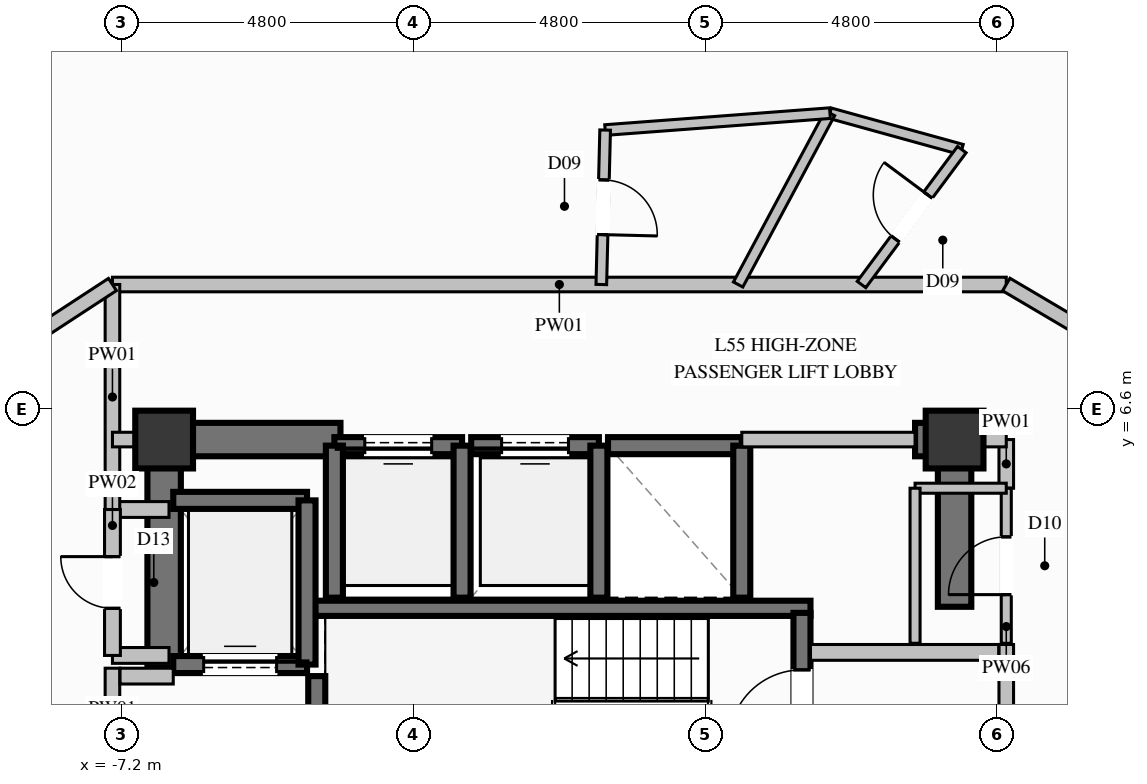
"""IFC4 building model, lengths in metres.
Left out: names, types, materials, properties, quantities, classifications, styles, units other than length and angle.
Written with IfcOpenShell. Run it as: python <this file> out.ifc"""

import sys

from ifc_helpers import new_model, si_unit, direction, frame, frame_2d, origin, origin_2d, place, context, subcontext, project, spatial, rectangle, extrude, element, fill, save


model = new_model("IFC4")
c1 = context("Model", 3, precision=1e-05, world=origin(), true_north=direction((0.0, 1.0)))
c2 = subcontext(c1, "Body", "Model", "MODEL_VIEW")
j1 = project(units=[si_unit("LENGTHUNIT", "METRE"), si_unit("PLANEANGLEUNIT", "RADIAN")], contexts=[c1])
p1 = place(None, origin())
s1 = spatial("IfcSite", under=j1, at=p1, CompositionType="ELEMENT")
p2 = place(p1, origin())
s2 = spatial("IfcBuilding", under=s1, at=p2, CompositionType="ELEMENT")
p3 = place(p2, frame((0.0, 0.0, 212.8)))
s3 = spatial("IfcBuildingStorey", under=s2, at=p3, CompositionType="ELEMENT", Elevation=212.8)
for number, where, z_axis, x_axis in (
    (1, (6.5, 6.1, 0.0), (0.0, 0.0, 1.0), (1.0, 0.0, 0.0)),
    (2, (-6.5, 6.1, 0.0), (0.0, 0.0, 1.0), (1.0, 0.0, 0.0)),
):
    element("IfcColumn", number, at=place(p3, frame(where, z_axis=z_axis, x_axis=x_axis)), inside=s3, PredefinedType="COLUMN", context=c2, shape_type="SweptSolid", body=[
        extrude(rectangle(XDim=0.95, YDim=0.95, at=origin_2d()), origin(), (0.0, 0.0, 1.0), 3.6),
    ])
p4 = place(p3, frame((-4.13, 3.325, 0.0), z_axis=(0.0, 0.0, 1.0), x_axis=(1.0, 0.0, 0.0)))
e3 = element("IfcWall", 3, at=p4, inside=s3, PredefinedType="SOLIDWALL", context=c2, shape_type="SweptSolid", body=[
    extrude(rectangle(XDim=8.26, YDim=0.25, at=frame_2d((4.13, 0.0))), origin(), (0.0, 0.0, 1.0), 3.6),
])
p5 = place(p3, frame((-6.225, 6.1, 0.0), z_axis=(0.0, 0.0, 1.0), x_axis=(1.0, 0.0, 0.0)))
e4 = element("IfcWall", 4, at=p5, inside=s3, PredefinedType="SHEAR", context=c2, shape_type="SweptSolid", body=[
    extrude(rectangle(XDim=2.625, YDim=0.55, at=frame_2d((1.312, 0.0))), origin(), (0.0, 0.0, 1.0), 3.6),
])
p6 = place(p3, frame((5.85, 6.1, 0.0), z_axis=(0.0, 0.0, 1.0), x_axis=(1.0, 0.0, 0.0)))
e5 = element("IfcWall", 5, at=p6, inside=s3, PredefinedType="SHEAR", context=c2, shape_type="SweptSolid", body=[
    extrude(rectangle(XDim=0.375, YDim=0.55, at=frame_2d((0.188, 0.0))), origin(), (0.0, 0.0, 1.0), 3.6),
])
p7 = place(p3, frame((-6.5, 2.35, 0.0), z_axis=(0.0, 0.0, 1.0), x_axis=(0.0, 1.0, 0.0)))
e6 = element("IfcWall", 6, at=p7, inside=s3, PredefinedType="SHEAR", context=c2, shape_type="SweptSolid", body=[
    extrude(rectangle(XDim=4.025, YDim=0.55, at=frame_2d((2.012, 0.0))), origin(), (0.0, 0.0, 1.0), 3.6),
])
p8 = place(p3, frame((6.5, 3.35, 0.0), z_axis=(0.0, 0.0, 1.0), x_axis=(0.0, 1.0, 0.0)))
e7 = element("IfcWall", 7, at=p8, inside=s3, PredefinedType="SHEAR", context=c2, shape_type="SweptSolid", body=[
    extrude(rectangle(XDim=3.025, YDim=0.55, at=frame_2d((1.512, 0.0))), origin(), (0.0, 0.0, 1.0), 3.6),
])
p9 = place(p3, frame((-1.6, 6.0, 0.0), z_axis=(0.0, 0.0, 1.0), x_axis=(-1.0, 0.0, 0.0)))
e8 = element("IfcWall", 8, at=p9, inside=s3, PredefinedType="SOLIDWALL", context=c2, shape_type="SweptSolid", body=[
    extrude(rectangle(XDim=2.1, YDim=0.28, at=frame_2d((1.05, 0.0))), origin(), (0.0, 0.0, 1.0), 3.36),
])
p10 = place(p9, frame((0.5, 0.0, 0.0)))
e9 = element("IfcOpeningElement", 9, at=p10, cuts=e8, PredefinedType="OPENING", context=c2, shape_type="SweptSolid", body=[
    extrude(rectangle(XDim=1.1, YDim=2.2, at=frame_2d((0.55, 1.1))), frame((0.0, 0.15, 0.0), z_axis=(0.0, -1.0, 0.0), x_axis=(1.0, 0.0, 0.0)), (0.0, 0.0, 1.0), 0.3),
])
for number, where, z_axis, x_axis in (
    (10, (-3.7, 6.0, 0.0), (0.0, 0.0, 1.0), (0.0, -1.0, 0.0)),
    (11, (-1.6, 3.5, 0.0), (0.0, 0.0, 1.0), (0.0, 1.0, 0.0)),
):
    element("IfcWall", number, at=place(p3, frame(where, z_axis=z_axis, x_axis=x_axis)), inside=s3, PredefinedType="SOLIDWALL", context=c2, shape_type="SweptSolid", body=[
        extrude(rectangle(XDim=2.5, YDim=0.28, at=frame_2d((1.25, 0.0))), origin(), (0.0, 0.0, 1.0), 3.36),
    ])
p11 = place(p3, frame((0.65, 6.0, 0.0), z_axis=(0.0, 0.0, 1.0), x_axis=(-1.0, 0.0, 0.0)))
e12 = element("IfcWall", 12, at=p11, inside=s3, PredefinedType="SOLIDWALL", context=c2, shape_type="SweptSolid", body=[
    extrude(rectangle(XDim=2.1, YDim=0.28, at=frame_2d((1.05, 0.0))), origin(), (0.0, 0.0, 1.0), 3.36),
])
p12 = place(p11, frame((0.5, 0.0, 0.0)))
e13 = element("IfcOpeningElement", 13, at=p12, cuts=e12, PredefinedType="OPENING", context=c2, shape_type="SweptSolid", body=[
    extrude(rectangle(XDim=1.1, YDim=2.2, at=frame_2d((0.55, 1.1))), frame((0.0, 0.15, 0.0), z_axis=(0.0, -1.0, 0.0), x_axis=(1.0, 0.0, 0.0)), (0.0, 0.0, 1.0), 0.3),
])
p13 = place(p3, frame((0.65, 3.5, 0.0), z_axis=(0.0, 0.0, 1.0), x_axis=(0.0, 1.0, 0.0)))
e14 = element("IfcWall", 14, at=p13, inside=s3, PredefinedType="SOLIDWALL", context=c2, shape_type="SweptSolid", body=[
    extrude(rectangle(XDim=2.5, YDim=0.28, at=frame_2d((1.25, 0.0))), origin(), (0.0, 0.0, 1.0), 3.36),
])
p14 = place(p3, frame((3.0, 6.0, 0.0), z_axis=(0.0, 0.0, 1.0), x_axis=(-1.0, 0.0, 0.0)))
e15 = element("IfcWall", 15, at=p14, inside=s3, PredefinedType="SOLIDWALL", context=c2, shape_type="SweptSolid", body=[
    extrude(rectangle(XDim=2.2, YDim=0.28, at=frame_2d((1.1, 0.0))), origin(), (0.0, 0.0, 1.0), 3.36),
])
p15 = place(p3, frame((3.0, 3.5, 0.0), z_axis=(0.0, 0.0, 1.0), x_axis=(0.0, 1.0, 0.0)))
e16 = element("IfcWall", 16, at=p15, inside=s3, PredefinedType="SOLIDWALL", context=c2, shape_type="SweptSolid", body=[
    extrude(rectangle(XDim=2.5, YDim=0.28, at=frame_2d((1.25, 0.0))), origin(), (0.0, 0.0, 1.0), 3.36),
])
p16 = place(p3, frame((-6.35, 2.4, 0.0), z_axis=(0.0, 0.0, 1.0), x_axis=(1.0, 0.0, 0.0)))
e17 = element("IfcWall", 17, at=p16, inside=s3, PredefinedType="SOLIDWALL", context=c2, shape_type="SweptSolid", body=[
    extrude(rectangle(XDim=2.2, YDim=0.28, at=frame_2d((1.1, 0.0))), origin(), (0.0, 0.0, 1.0), 3.36),
])
p17 = place(p16, frame((0.5, 0.0, 0.0)))
e18 = element("IfcOpeningElement", 18, at=p17, cuts=e17, PredefinedType="OPENING", context=c2, shape_type="SweptSolid", body=[
    extrude(rectangle(XDim=1.2, YDim=2.2, at=frame_2d((0.6, 1.1))), frame((0.0, 0.15, 0.0), z_axis=(0.0, -1.0, 0.0), x_axis=(1.0, 0.0, 0.0)), (0.0, 0.0, 1.0), 0.3),
])
p18 = place(p3, frame((-4.15, 5.1, 0.0), z_axis=(0.0, 0.0, 1.0), x_axis=(-1.0, 0.0, 0.0)))
e19 = element("IfcWall", 19, at=p18, inside=s3, PredefinedType="SOLIDWALL", context=c2, shape_type="SweptSolid", body=[
    extrude(rectangle(XDim=2.2, YDim=0.28, at=frame_2d((1.1, 0.0))), origin(), (0.0, 0.0, 1.0), 3.36),
])
p19 = place(p3, frame((-4.15, 2.4, 0.0), z_axis=(0.0, 0.0, 1.0), x_axis=(0.0, 1.0, 0.0)))
e20 = element("IfcWall", 20, at=p19, inside=s3, PredefinedType="SOLIDWALL", context=c2, shape_type="SweptSolid", body=[
    extrude(rectangle(XDim=2.7, YDim=0.28, at=frame_2d((1.35, 0.0))), origin(), (0.0, 0.0, 1.0), 3.36),
])
p20 = place(p3, frame((-3.99, -3.25, 0.0), z_axis=(0.0, 0.0, 1.0), x_axis=(0.0, 1.0, 0.0)))
e21 = element("IfcWall", 21, at=p20, inside=s3, PredefinedType="SOLIDWALL", context=c2, shape_type="SweptSolid", body=[
    extrude(rectangle(XDim=5.46, YDim=0.28, at=frame_2d((2.73, 0.0))), origin(), (0.0, 0.0, 1.0), 3.36),
])
p21 = place(p20, frame((0.937, 0.0, 0.0)))
e22 = element("IfcOpeningElement", 22, at=p21, cuts=e21, PredefinedType="OPENING", context=c2, shape_type="SweptSolid", body=[
    extrude(rectangle(XDim=1.2, YDim=2.2, at=frame_2d((0.6, 1.1))), frame((0.0, 0.15, 0.0), z_axis=(0.0, -1.0, 0.0), x_axis=(1.0, 0.0, 0.0)), (0.0, 0.0, 1.0), 0.3),
])
p22 = place(p3, frame((3.99, -2.21, 0.0), z_axis=(0.0, 0.0, 1.0), x_axis=(0.0, 1.0, 0.0)))
e23 = element("IfcWall", 23, at=p22, inside=s3, PredefinedType="SOLIDWALL", context=c2, shape_type="SweptSolid", body=[
    extrude(rectangle(XDim=5.46, YDim=0.28, at=frame_2d((2.73, 0.0))), origin(), (0.0, 0.0, 1.0), 3.36),
])
p23 = place(p22, frame((3.323, 0.0, 0.0)))
e24 = element("IfcOpeningElement", 24, at=p23, cuts=e23, PredefinedType="OPENING", context=c2, shape_type="SweptSolid", body=[
    extrude(rectangle(XDim=1.2, YDim=2.2, at=frame_2d((0.6, 1.1))), frame((0.0, 0.15, 0.0), z_axis=(0.0, -1.0, 0.0), x_axis=(1.0, 0.0, 0.0)), (0.0, 0.0, 1.0), 0.3),
])
p24 = place(p3, frame((-7.35, -3.38, 0.0), z_axis=(0.0, 0.0, 1.0), x_axis=(0.0, 1.0, 0.0)))
e25 = element("IfcWall", 25, at=p24, inside=s3, PredefinedType="PARTITIONING", context=c2, shape_type="SweptSolid", body=[
    extrude(rectangle(XDim=5.72, YDim=0.24, at=frame_2d((2.86, 0.0))), origin(), (0.0, 0.0, 1.0), 2.445),
])
p25 = place(p24, frame((1.599, 0.0, 0.0)))
e26 = element("IfcOpeningElement", 26, at=p25, cuts=e25, PredefinedType="OPENING", context=c2, shape_type="SweptSolid", body=[
    extrude(rectangle(XDim=1.15, YDim=2.2, at=frame_2d((0.575, 1.1))), frame((0.0, 0.13, 0.0), z_axis=(0.0, -1.0, 0.0), x_axis=(1.0, 0.0, 0.0)), (0.0, 0.0, 1.0), 0.26),
])
p26 = place(p3, frame((-7.225, 2.21, 0.0), z_axis=(0.0, 0.0, 1.0), x_axis=(1.0, 0.0, 0.0)))
e27 = element("IfcWall", 27, at=p26, inside=s3, PredefinedType="PARTITIONING", context=c2, shape_type="SweptSolid", body=[
    extrude(rectangle(XDim=0.875, YDim=0.26, at=frame_2d((0.438, 0.0))), origin(), (0.0, 0.0, 1.0), 3.36),
])
p27 = place(p3, frame((7.35, -2.34, 0.0), z_axis=(0.0, 0.0, 1.0), x_axis=(0.0, 1.0, 0.0)))
e28 = element("IfcWall", 28, at=p27, inside=s3, PredefinedType="PARTITIONING", context=c2, shape_type="SweptSolid", body=[
    extrude(rectangle(XDim=5.07, YDim=0.24, at=frame_2d((2.535, 0.0))), origin(), (0.0, 0.0, 1.0), 2.445),
])
p28 = place(p27, frame((2.548, 0.0, 0.0)))
e29 = element("IfcOpeningElement", 29, at=p28, cuts=e28, PredefinedType="OPENING", context=c2, shape_type="SweptSolid", body=[
    extrude(rectangle(XDim=1.15, YDim=2.2, at=frame_2d((0.575, 1.1))), frame((0.0, 0.13, 0.0), z_axis=(0.0, -1.0, 0.0), x_axis=(1.0, 0.0, 0.0)), (0.0, 0.0, 1.0), 0.26),
])
p29 = place(p3, frame((4.13, 2.6, 0.0), z_axis=(0.0, 0.0, 1.0), x_axis=(1.0, 0.0, 0.0)))
e30 = element("IfcWall", 30, at=p29, inside=s3, PredefinedType="PARTITIONING", context=c2, shape_type="SweptSolid", body=[
    extrude(rectangle(XDim=3.095, YDim=0.26, at=frame_2d((1.548, 0.0))), origin(), (0.0, 0.0, 1.0), 3.36),
])
for number, where, z_axis, x_axis in (
    (31, (-7.35, 4.95, 0.0), (0.0, 0.0, 1.0), (1.0, 0.0, 0.0)),
    (32, (-7.35, 2.55, 0.0), (0.0, 0.0, 1.0), (1.0, 0.0, 0.0)),
):
    element("IfcWall", number, at=place(p3, frame(where, z_axis=z_axis, x_axis=x_axis)), inside=s3, PredefinedType="PARTITIONING", context=c2, shape_type="SweptSolid", body=[
        extrude(rectangle(XDim=0.93, YDim=0.26, at=frame_2d((0.465, 0.0))), origin(), (0.0, 0.0, 1.0), 3.36),
    ])
p30 = place(p3, frame((-7.35, 2.55, 0.0), z_axis=(0.0, 0.0, 1.0), x_axis=(0.0, 1.0, 0.0)))
e33 = element("IfcWall", 33, at=p30, inside=s3, PredefinedType="PARTITIONING", context=c2, shape_type="SweptSolid", body=[
    extrude(rectangle(XDim=2.4, YDim=0.26, at=frame_2d((1.2, 0.0))), origin(), (0.0, 0.0, 1.0), 2.445),
])
p31 = place(p30, frame((0.775, 0.0, 0.0)))
e34 = element("IfcOpeningElement", 34, at=p31, cuts=e33, PredefinedType="OPENING", context=c2, shape_type="SweptSolid", body=[
    extrude(rectangle(XDim=0.85, YDim=2.05, at=frame_2d((0.425, 1.025))), frame((0.0, 0.14, 0.0), z_axis=(0.0, -1.0, 0.0), x_axis=(1.0, 0.0, 0.0)), (0.0, 0.0, 1.0), 0.28),
])
p32 = place(p3, frame((-7.35, 8.65, 0.0), z_axis=(0.0, 0.0, 1.0), x_axis=(1.0, 0.0, 0.0)))
e35 = element("IfcWall", 35, at=p32, inside=s3, PredefinedType="PARTITIONING", context=c2, shape_type="SweptSolid", body=[
    extrude(rectangle(XDim=14.7, YDim=0.24, at=frame_2d((7.35, 0.0))), origin(), (0.0, 0.0, 1.0), 3.36),
])
p33 = place(p3, frame((3.0, 6.1, 0.0), z_axis=(0.0, 0.0, 1.0), x_axis=(1.0, 0.0, 0.0)))
e36 = element("IfcWall", 36, at=p33, inside=s3, PredefinedType="PARTITIONING", context=c2, shape_type="SweptSolid", body=[
    extrude(rectangle(XDim=2.85, YDim=0.24, at=frame_2d((1.425, 0.0))), origin(), (0.0, 0.0, 1.0), 2.445),
])
p34 = place(p3, frame((7.35, 5.3, 0.0), z_axis=(0.0, 0.0, 1.0), x_axis=(0.0, 1.0, 0.0)))
e37 = element("IfcWall", 37, at=p34, inside=s3, PredefinedType="PARTITIONING", context=c2, shape_type="SweptSolid", body=[
    extrude(rectangle(XDim=0.8, YDim=0.24, at=frame_2d((0.4, 0.0))), origin(), (0.0, 0.0, 1.0), 2.445),
])
p35 = place(p3, frame((6.5, 6.1, 0.0), z_axis=(0.0, 0.0, 1.0), x_axis=(1.0, 0.0, 0.0)))
e38 = element("IfcWall", 38, at=p35, inside=s3, PredefinedType="PARTITIONING", context=c2, shape_type="SweptSolid", body=[
    extrude(rectangle(XDim=0.85, YDim=0.24, at=frame_2d((0.425, 0.0))), origin(), (0.0, 0.0, 1.0), 2.876),
])
p36 = place(p3, frame((-7.35, 4.95, 0.0), z_axis=(0.0, 0.0, 1.0), x_axis=(0.0, 1.0, 0.0)))
e39 = element("IfcWall", 39, at=p36, inside=s3, PredefinedType="PARTITIONING", context=c2, shape_type="SweptSolid", body=[
    extrude(rectangle(XDim=3.7, YDim=0.24, at=frame_2d((1.85, 0.0))), origin(), (0.0, 0.0, 1.0), 2.445),
])
p37 = place(p3, frame((-7.35, 6.1, 0.0), z_axis=(0.0, 0.0, 1.0), x_axis=(1.0, 0.0, 0.0)))
e40 = element("IfcWall", 40, at=p37, inside=s3, PredefinedType="PARTITIONING", context=c2, shape_type="SweptSolid", body=[
    extrude(rectangle(XDim=0.85, YDim=0.24, at=frame_2d((0.425, 0.0))), origin(), (0.0, 0.0, 1.0), 2.876),
])
p38 = place(p3, frame((7.35, 2.75, 0.0), z_axis=(0.0, 0.0, 1.0), x_axis=(0.0, 1.0, 0.0)))
e41 = element("IfcWall", 41, at=p38, inside=s3, PredefinedType="PARTITIONING", context=c2, shape_type="SweptSolid", body=[
    extrude(rectangle(XDim=2.55, YDim=0.165, at=frame_2d((1.275, 0.0))), origin(), (0.0, 0.0, 1.0), 3.36),
])
p39 = place(p38, frame((0.8, 0.0, 0.0)))
e42 = element("IfcOpeningElement", 42, at=p39, cuts=e41, PredefinedType="OPENING", context=c2, shape_type="SweptSolid", body=[
    extrude(rectangle(XDim=0.95, YDim=2.1, at=frame_2d((0.475, 1.05))), frame((0.0, 0.093, 0.0), z_axis=(0.0, -1.0, 0.0), x_axis=(1.0, 0.0, 0.0)), (0.0, 0.0, 1.0), 0.185),
])
p40 = place(p3, frame((7.35, 5.3, 0.0), z_axis=(0.0, 0.0, 1.0), x_axis=(-1.0, 0.0, 0.0)))
e43 = element("IfcWall", 43, at=p40, inside=s3, PredefinedType="PARTITIONING", context=c2, shape_type="SweptSolid", body=[
    extrude(rectangle(XDim=1.5, YDim=0.165, at=frame_2d((0.75, 0.0))), origin(), (0.0, 0.0, 1.0), 2.445),
])
p41 = place(p3, frame((5.85, 5.3, 0.0), z_axis=(0.0, 0.0, 1.0), x_axis=(0.0, -1.0, 0.0)))
e44 = element("IfcWall", 44, at=p41, inside=s3, PredefinedType="PARTITIONING", context=c2, shape_type="SweptSolid", body=[
    extrude(rectangle(XDim=2.55, YDim=0.165, at=frame_2d((1.275, 0.0))), origin(), (0.0, 0.0, 1.0), 2.445),
])
p42 = place(p3, frame((4.45, 11.468, 0.0), z_axis=(0.0, 0.0, 1.0), x_axis=(0.963902406986, -0.266255797697, 0.0)))
e45 = element("IfcWall", 45, at=p42, inside=s3, PredefinedType="PLUMBINGWALL", context=c2, shape_type="SweptSolid", body=[
    extrude(rectangle(XDim=2.25, YDim=0.175, at=frame_2d((1.125, 0.0))), origin(), (0.0, 0.0, 1.0), 3.36),
])
p43 = place(p3, frame((4.45, 11.468, 0.0), z_axis=(0.0, 0.0, 1.0), x_axis=(-0.472295577566, -0.881440234736, 0.0)))
e46 = element("IfcWall", 46, at=p43, inside=s3, PredefinedType="PLUMBINGWALL", context=c2, shape_type="SweptSolid", body=[
    extrude(rectangle(XDim=3.197, YDim=0.175, at=frame_2d((1.599, 0.0))), origin(), (0.0, 0.0, 1.0), 3.36),
])
p44 = place(p3, frame((4.969, 8.65, 0.0), z_axis=(0.0, 0.0, 1.0), x_axis=(0.596675067376, 0.802482936872, 0.0)))
e47 = element("IfcWall", 47, at=p44, inside=s3, PredefinedType="PLUMBINGWALL", context=c2, shape_type="SweptSolid", body=[
    extrude(rectangle(XDim=2.765, YDim=0.175, at=frame_2d((1.383, 0.0))), origin(), (0.0, 0.0, 1.0), 3.36),
])
p45 = place(p44, frame((0.933, 0.0, 0.0)))
e48 = element("IfcOpeningElement", 48, at=p45, cuts=e47, PredefinedType="OPENING", context=c2, shape_type="SweptSolid", body=[
    extrude(rectangle(XDim=0.9, YDim=2.1, at=frame_2d((0.45, 1.05))), frame((0.0, 0.098, 0.0), z_axis=(0.0, -1.0, 0.0), x_axis=(1.0, 0.0, 0.0)), (0.0, 0.0, 1.0), 0.195),
])
p46 = place(p3, frame((7.35, 8.65, 0.0), z_axis=(0.0, 0.0, 1.0), x_axis=(0.861164858472, -0.508325768118, 0.0)))
e49 = element("IfcWall", 49, at=p46, inside=s3, PredefinedType="PARTITIONING", context=c2, shape_type="SweptSolid", body=[
    extrude(rectangle(XDim=4.77, YDim=0.24, at=frame_2d((2.385, 0.0))), origin(), (0.0, 0.0, 1.0), 3.36),
])
p47 = place(p46, frame((1.885, 0.0, 0.0)))
e50 = element("IfcOpeningElement", 50, at=p47, cuts=e49, PredefinedType="OPENING", context=c2, shape_type="SweptSolid", body=[
    extrude(rectangle(XDim=1.0, YDim=2.2, at=frame_2d((0.5, 1.1))), frame((0.0, 0.13, 0.0), z_axis=(0.0, -1.0, 0.0), x_axis=(1.0, 0.0, 0.0)), (0.0, 0.0, 1.0), 0.26),
])
p48 = place(p3, frame((0.753, 11.19, 0.0), z_axis=(0.0, 0.0, 1.0), x_axis=(0.997183202625, 0.075004402548, 0.0)))
e51 = element("IfcWall", 51, at=p48, inside=s3, PredefinedType="PLUMBINGWALL", context=c2, shape_type="SweptSolid", body=[
    extrude(rectangle(XDim=3.708, YDim=0.175, at=frame_2d((1.854, 0.0))), origin(), (0.0, 0.0, 1.0), 3.042),
])
p49 = place(p3, frame((0.753, 11.19, 0.0), z_axis=(0.0, 0.0, 1.0), x_axis=(-0.024790533277, -0.999692667503, 0.0)))
e52 = element("IfcWall", 52, at=p49, inside=s3, PredefinedType="PLUMBINGWALL", context=c2, shape_type="SweptSolid", body=[
    extrude(rectangle(XDim=2.541, YDim=0.175, at=frame_2d((1.271, 0.0))), origin(), (0.0, 0.0, 1.0), 3.36),
])
p50 = place(p49, frame((0.82, 0.0, 0.0)))
e53 = element("IfcOpeningElement", 53, at=p50, cuts=e52, PredefinedType="OPENING", context=c2, shape_type="SweptSolid", body=[
    extrude(rectangle(XDim=0.9, YDim=2.1, at=frame_2d((0.45, 1.05))), frame((0.0, 0.098, 0.0), z_axis=(0.0, -1.0, 0.0), x_axis=(1.0, 0.0, 0.0)), (0.0, 0.0, 1.0), 0.195),
])
p51 = place(p3, frame((-11.058, 6.225, 0.0), z_axis=(0.0, 0.0, 1.0), x_axis=(0.83693466485, 0.547302810857, 0.0)))
e54 = element("IfcWall", 54, at=p51, inside=s3, PredefinedType="PARTITIONING", context=c2, shape_type="SweptSolid", body=[
    extrude(rectangle(XDim=4.43, YDim=0.24, at=frame_2d((2.215, 0.0))), origin(), (0.0, 0.0, 1.0), 3.36),
])
p52 = place(p51, frame((1.715, 0.0, 0.0)))
e55 = element("IfcOpeningElement", 55, at=p52, cuts=e54, PredefinedType="OPENING", context=c2, shape_type="SweptSolid", body=[
    extrude(rectangle(XDim=1.0, YDim=2.2, at=frame_2d((0.5, 1.1))), frame((0.0, 0.13, 0.0), z_axis=(0.0, -1.0, 0.0), x_axis=(1.0, 0.0, 0.0)), (0.0, 0.0, 1.0), 0.26),
])
p53 = place(p10, origin())
e56 = element("IfcDoor", 56, at=p53, inside=s3, OperationType="SLIDING_TO_LEFT", PredefinedType="DOOR", context=c2, shape_type="SweptSolid", body=[
    extrude(rectangle(XDim=1.1, YDim=2.2, at=frame_2d((0.55, 1.1))), frame((0.0, 0.025, 0.0), z_axis=(0.0, -1.0, 0.0), x_axis=(1.0, 0.0, 0.0)), (0.0, 0.0, 1.0), 0.05),
])
fill(e9, e56)
p54 = place(p12, origin())
e57 = element("IfcDoor", 57, at=p54, inside=s3, OperationType="SLIDING_TO_LEFT", PredefinedType="DOOR", context=c2, shape_type="SweptSolid", body=[
    extrude(rectangle(XDim=1.1, YDim=2.2, at=frame_2d((0.55, 1.1))), frame((0.0, 0.025, 0.0), z_axis=(0.0, -1.0, 0.0), x_axis=(1.0, 0.0, 0.0)), (0.0, 0.0, 1.0), 0.05),
])
fill(e13, e57)
p55 = place(p17, origin())
e58 = element("IfcDoor", 58, at=p55, inside=s3, OperationType="SLIDING_TO_LEFT", PredefinedType="DOOR", context=c2, shape_type="SweptSolid", body=[
    extrude(rectangle(XDim=1.2, YDim=2.2, at=frame_2d((0.6, 1.1))), frame((0.0, 0.025, 0.0), z_axis=(0.0, -1.0, 0.0), x_axis=(1.0, 0.0, 0.0)), (0.0, 0.0, 1.0), 0.05),
])
fill(e18, e58)
p56 = place(p23, origin())
e59 = element("IfcDoor", 59, at=p56, inside=s3, OperationType="SINGLE_SWING_LEFT", PredefinedType="DOOR", context=c2, shape_type="SweptSolid", body=[
    extrude(rectangle(XDim=1.2, YDim=2.2, at=frame_2d((0.6, 1.1))), frame((0.0, 0.025, 0.0), z_axis=(0.0, -1.0, 0.0), x_axis=(1.0, 0.0, 0.0)), (0.0, 0.0, 1.0), 0.05),
])
fill(e24, e59)
p57 = place(p31, origin())
e60 = element("IfcDoor", 60, at=p57, inside=s3, OperationType="SINGLE_SWING_RIGHT", PredefinedType="DOOR", context=c2, shape_type="SweptSolid", body=[
    extrude(rectangle(XDim=0.85, YDim=2.05, at=frame_2d((0.425, 1.025))), frame((0.0, 0.025, 0.0), z_axis=(0.0, -1.0, 0.0), x_axis=(1.0, 0.0, 0.0)), (0.0, 0.0, 1.0), 0.05),
])
fill(e34, e60)
p58 = place(p39, origin())
e61 = element("IfcDoor", 61, at=p58, inside=s3, OperationType="SINGLE_SWING_LEFT", PredefinedType="DOOR", context=c2, shape_type="SweptSolid", body=[
    extrude(rectangle(XDim=0.95, YDim=2.1, at=frame_2d((0.475, 1.05))), frame((0.0, 0.025, 0.0), z_axis=(0.0, -1.0, 0.0), x_axis=(1.0, 0.0, 0.0)), (0.0, 0.0, 1.0), 0.05),
])
fill(e42, e61)
p59 = place(p45, origin())
e62 = element("IfcDoor", 62, at=p59, inside=s3, OperationType="SINGLE_SWING_RIGHT", PredefinedType="DOOR", context=c2, shape_type="SweptSolid", body=[
    extrude(rectangle(XDim=0.9, YDim=2.1, at=frame_2d((0.45, 1.05))), frame((0.0, 0.025, 0.0), z_axis=(0.0, -1.0, 0.0), x_axis=(1.0, 0.0, 0.0)), (0.0, 0.0, 1.0), 0.05),
])
fill(e48, e62)
p60 = place(p50, origin())
e63 = element("IfcDoor", 63, at=p60, inside=s3, OperationType="SINGLE_SWING_RIGHT", PredefinedType="DOOR", context=c2, shape_type="SweptSolid", body=[
    extrude(rectangle(XDim=0.9, YDim=2.1, at=frame_2d((0.45, 1.05))), frame((0.0, 0.025, 0.0), z_axis=(0.0, -1.0, 0.0), x_axis=(1.0, 0.0, 0.0)), (0.0, 0.0, 1.0), 0.05),
])
fill(e53, e63)
save(model, sys.argv[1])
